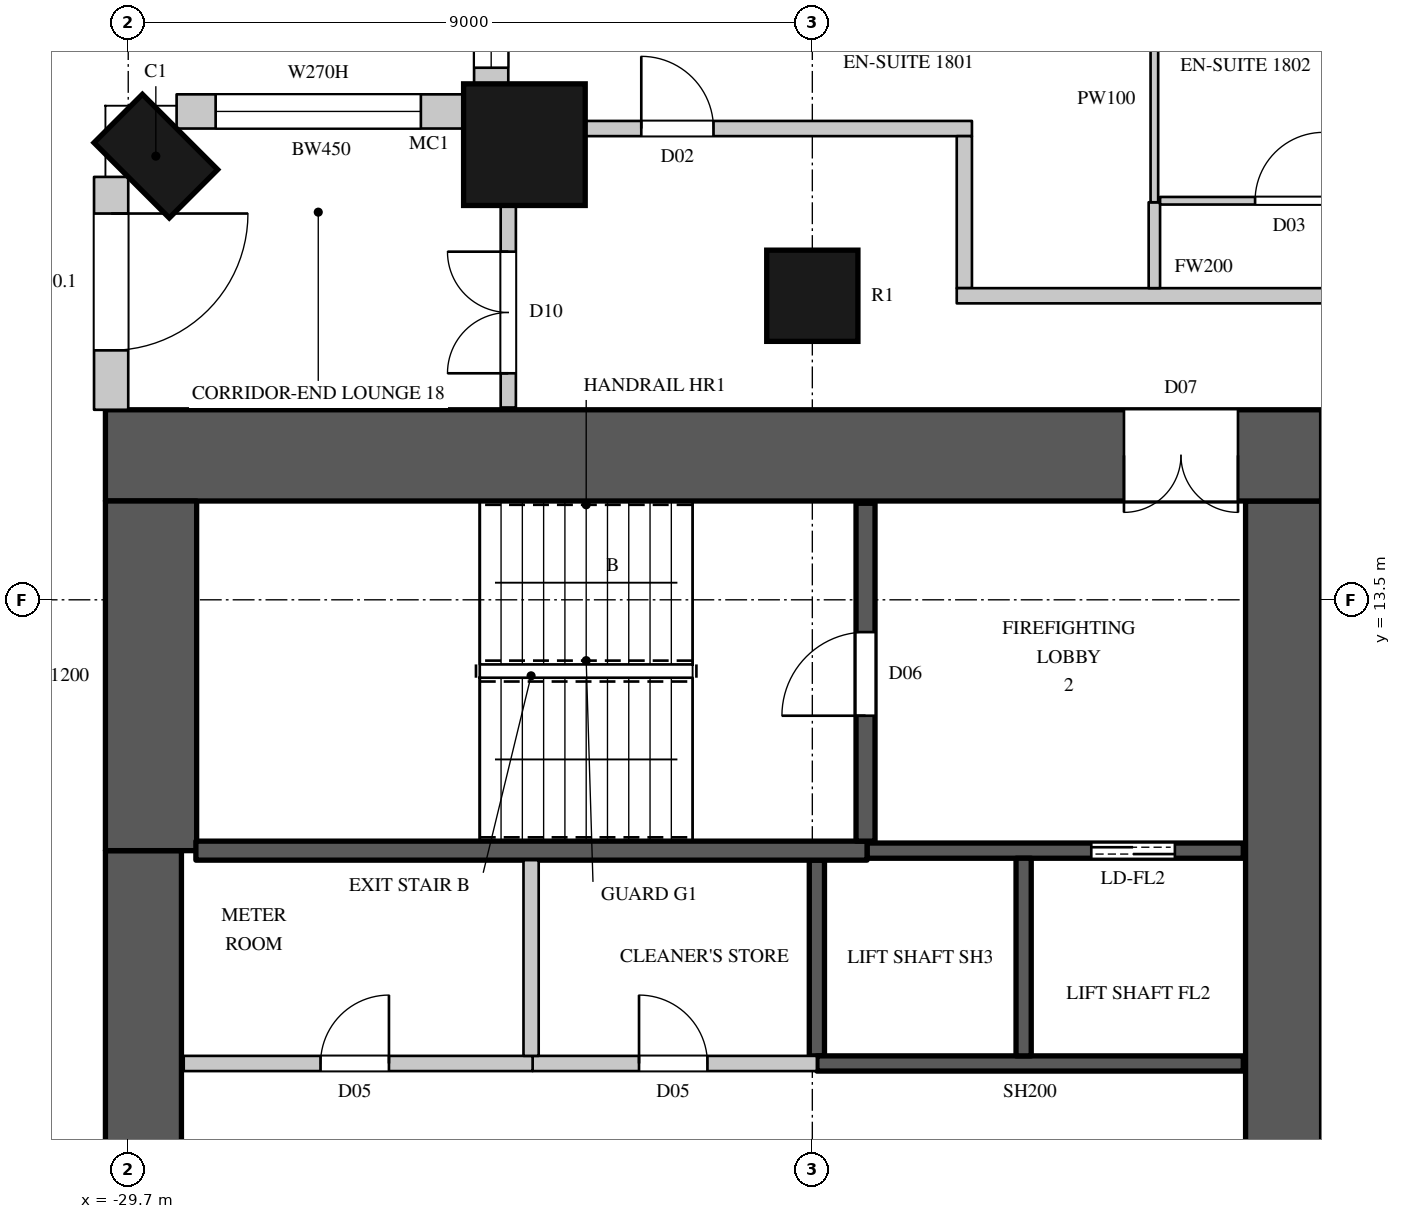
"""IFC4 building model, lengths in metres.
Left out: names, types, materials, properties, quantities, classifications, styles, units other than length and angle.
Written with IfcOpenShell. Run it as: python <this file> out.ifc"""

import sys

from ifc_helpers import new_model, si_unit, direction, frame, frame_2d, origin, origin_2d, place, context, subcontext, project, spatial, rectangle, circle, extrude, element, fill, save


model = new_model("IFC4")
c1 = context("Model", 3, precision=1e-05, world=origin(), true_north=direction((0.0, 1.0)))
c2 = subcontext(c1, "Body", "Model", "MODEL_VIEW")
j1 = project(units=[si_unit("LENGTHUNIT", "METRE"), si_unit("PLANEANGLEUNIT", "RADIAN")], contexts=[c1])
p1 = place(None, origin())
s1 = spatial("IfcSite", under=j1, at=p1, CompositionType="ELEMENT")
p2 = place(p1, origin())
s2 = spatial("IfcBuilding", under=s1, at=p2, CompositionType="ELEMENT")
p3 = place(p2, frame((0.0, 0.0, 95.1)))
s3 = spatial("IfcBuildingStorey", under=s2, at=p3, CompositionType="ELEMENT", Elevation=95.1)
p4 = place(p3, frame((-29.337, 19.337, 0.0), z_axis=(0.0, 0.0, 1.0), x_axis=(-0.707106781187, -0.707106781187, 0.0)))
e1 = element("IfcColumn", 1, at=p4, inside=s3, PredefinedType="COLUMN", context=c2, shape_type="SweptSolid", body=[
    extrude(rectangle(XDim=0.9, YDim=1.4, at=origin_2d()), origin(), (0.0, 0.0, 1.0), 3.6),
])
p5 = place(p3, frame((-24.488, 19.488, 0.0), z_axis=(0.0, 0.0, 1.0), x_axis=(1.0, 0.0, 0.0)))
e2 = element("IfcColumn", 2, at=p5, inside=s3, PredefinedType="COLUMN", context=c2, shape_type="SweptSolid", body=[
    extrude(circle(Radius=0.8, at=origin_2d()), origin(), (0.0, 0.0, 1.0), 3.6),
])
p6 = place(p3, frame((-20.7, 17.5, 0.0), z_axis=(0.0, 0.0, 1.0), x_axis=(1.0, 0.0, 0.0)))
e3 = element("IfcColumn", 3, at=p6, inside=s3, PredefinedType="COLUMN", context=c2, shape_type="SweptSolid", body=[
    extrude(circle(Radius=0.6, at=origin_2d()), origin(), (0.0, 0.0, 1.0), 3.6),
])
p7 = place(p3, frame((-29.925, 19.064, 0.0), z_axis=(0.0, 0.0, 1.0), x_axis=(0.0, -1.0, 0.0)))
e4 = element("IfcWall", 4, at=p7, inside=s3, PredefinedType="SOLIDWALL", context=c2, shape_type="SweptSolid", body=[
    extrude(rectangle(XDim=3.064, YDim=0.45, at=frame_2d((1.532, 0.0))), origin(), (0.0, 0.0, 1.0), 3.3),
])
p8 = place(p7, frame((0.482, 0.0, 0.0)))
e5 = element("IfcOpeningElement", 5, at=p8, cuts=e4, PredefinedType="OPENING", context=c2, shape_type="SweptSolid", body=[
    extrude(rectangle(XDim=1.8, YDim=2.4, at=frame_2d((0.9, 1.2))), frame((0.0, 0.235, 0.0), z_axis=(0.0, -1.0, 0.0), x_axis=(1.0, 0.0, 0.0)), (0.0, 0.0, 1.0), 0.47),
])
p9 = place(p3, frame((-24.925, 22.05, 0.0), z_axis=(0.0, 0.0, 1.0), x_axis=(0.0, -1.0, 0.0)))
e6 = element("IfcWall", 6, at=p9, inside=s3, PredefinedType="SOLIDWALL", context=c2, shape_type="SweptSolid", body=[
    extrude(rectangle(XDim=1.792, YDim=0.45, at=frame_2d((0.896, 0.0))), origin(), (0.0, 0.0, 1.0), 3.3),
])
p10 = place(p9, frame((0.35, 0.0, 1.05)))
e7 = element("IfcOpeningElement", 7, at=p10, cuts=e6, PredefinedType="OPENING", context=c2, shape_type="SweptSolid", body=[
    extrude(rectangle(XDim=1.2, YDim=2.0, at=frame_2d((0.6, 1.0))), frame((0.0, 0.235, 0.0), z_axis=(0.0, -1.0, 0.0), x_axis=(1.0, 0.0, 0.0)), (0.0, 0.0, 1.0), 0.47),
])
p11 = place(p3, frame((-25.259, 19.925, 0.0), z_axis=(0.0, 0.0, 1.0), x_axis=(-1.0, 0.0, 0.0)))
e8 = element("IfcWall", 8, at=p11, inside=s3, PredefinedType="SOLIDWALL", context=c2, shape_type="SweptSolid", body=[
    extrude(rectangle(XDim=3.805, YDim=0.45, at=frame_2d((1.903, 0.0))), origin(), (0.0, 0.0, 1.0), 3.3),
])
p12 = place(p11, frame((0.592, 0.0, 1.05)))
e9 = element("IfcOpeningElement", 9, at=p12, cuts=e8, PredefinedType="OPENING", context=c2, shape_type="SweptSolid", body=[
    extrude(rectangle(XDim=2.7, YDim=2.0, at=frame_2d((1.35, 1.0))), frame((0.0, 0.235, 0.0), z_axis=(0.0, -1.0, 0.0), x_axis=(1.0, 0.0, 0.0)), (0.0, 0.0, 1.0), 0.47),
])
p13 = place(p3, frame((-30.0, 15.4, 0.0), z_axis=(0.0, 0.0, 1.0), x_axis=(1.0, 0.0, 0.0)))
e10 = element("IfcWall", 10, at=p13, inside=s3, PredefinedType="SHEAR", context=c2, shape_type="SweptSolid", body=[
    extrude(rectangle(XDim=16.0, YDim=1.2, at=frame_2d((8.0, 0.0))), origin(), (0.0, 0.0, 1.0), 3.6),
])
p14 = place(p13, frame((13.4, 0.0, 0.0)))
e11 = element("IfcOpeningElement", 11, at=p14, cuts=e10, PredefinedType="OPENING", context=c2, shape_type="SweptSolid", body=[
    extrude(rectangle(XDim=1.5, YDim=2.4, at=frame_2d((0.75, 1.2))), frame((0.0, 0.61, 0.0), z_axis=(0.0, -1.0, 0.0), x_axis=(1.0, 0.0, 0.0)), (0.0, 0.0, 1.0), 1.22),
])
p15 = place(p3, frame((-14.5, -14.8, 0.0), z_axis=(0.0, 0.0, 1.0), x_axis=(0.0, 1.0, 0.0)))
e12 = element("IfcWall", 12, at=p15, inside=s3, PredefinedType="SHEAR", context=c2, shape_type="SweptSolid", body=[
    extrude(rectangle(XDim=29.6, YDim=1.0, at=frame_2d((14.8, 0.0))), origin(), (0.0, 0.0, 1.0), 3.6),
])
p16 = place(p15, frame((8.45, 0.0, 0.0)))
e13 = element("IfcOpeningElement", 13, at=p16, cuts=e12, PredefinedType="OPENING", context=c2, shape_type="SweptSolid", body=[
    extrude(rectangle(XDim=1.5, YDim=2.4, at=frame_2d((0.75, 1.2))), frame((0.0, 0.51, 0.0), z_axis=(0.0, -1.0, 0.0), x_axis=(1.0, 0.0, 0.0)), (0.0, 0.0, 1.0), 1.02),
])
p17 = place(p15, frame((19.65, 0.0, 0.0)))
e14 = element("IfcOpeningElement", 14, at=p17, cuts=e12, PredefinedType="OPENING", context=c2, shape_type="SweptSolid", body=[
    extrude(rectangle(XDim=1.5, YDim=2.4, at=frame_2d((0.75, 1.2))), frame((0.0, 0.51, 0.0), z_axis=(0.0, -1.0, 0.0), x_axis=(1.0, 0.0, 0.0)), (0.0, 0.0, 1.0), 1.02),
])
p18 = place(p15, frame((14.5, 0.0, 0.0)))
e15 = element("IfcOpeningElement", 15, at=p18, cuts=e12, PredefinedType="OPENING", context=c2, shape_type="SweptSolid", body=[
    extrude(rectangle(XDim=0.6, YDim=2.0, at=frame_2d((0.3, 1.0))), frame((0.0, 0.51, 0.0), z_axis=(0.0, -1.0, 0.0), x_axis=(1.0, 0.0, 0.0)), (0.0, 0.0, 1.0), 1.02),
])
p19 = place(p3, frame((-29.5, -10.2, 0.0), z_axis=(0.0, 0.0, 1.0), x_axis=(0.0, 1.0, 0.0)))
e16 = element("IfcWall", 16, at=p19, inside=s3, PredefinedType="SHEAR", context=c2, shape_type="SweptSolid", body=[
    extrude(rectangle(XDim=20.4, YDim=1.0, at=frame_2d((10.2, 0.0))), origin(), (0.0, 0.0, 1.0), 3.6),
])
p20 = place(p3, frame((-29.4, 10.2, 0.0), z_axis=(0.0, 0.0, 1.0), x_axis=(0.0, 1.0, 0.0)))
e17 = element("IfcWall", 17, at=p20, inside=s3, PredefinedType="SHEAR", context=c2, shape_type="SweptSolid", body=[
    extrude(rectangle(XDim=4.6, YDim=1.2, at=frame_2d((2.3, 0.0))), origin(), (0.0, 0.0, 1.0), 3.6),
])
p21 = place(p3, frame((-24.7, 16.03, 0.0), z_axis=(0.0, 0.0, 1.0), x_axis=(0.0, 1.0, 0.0)))
e18 = element("IfcWall", 18, at=p21, inside=s3, PredefinedType="PARTITIONING", context=c2, shape_type="SweptSolid", body=[
    extrude(rectangle(XDim=2.67, YDim=0.2, at=frame_2d((1.335, 0.0))), origin(), (0.0, 0.0, 1.0), 3.3),
])
p22 = place(p21, frame((0.45, 0.0, 0.0)))
e19 = element("IfcOpeningElement", 19, at=p22, cuts=e18, PredefinedType="OPENING", context=c2, shape_type="SweptSolid", body=[
    extrude(rectangle(XDim=1.6, YDim=2.4, at=frame_2d((0.8, 1.2))), frame((0.0, 0.11, 0.0), z_axis=(0.0, -1.0, 0.0), x_axis=(1.0, 0.0, 0.0)), (0.0, 0.0, 1.0), 0.22),
])
p23 = place(p3, frame((-23.7, 19.7, 0.0), z_axis=(0.0, 0.0, 1.0), x_axis=(1.0, 0.0, 0.0)))
e20 = element("IfcWall", 20, at=p23, inside=s3, PredefinedType="PARTITIONING", context=c2, shape_type="SweptSolid", body=[
    extrude(rectangle(XDim=5.1, YDim=0.2, at=frame_2d((2.55, 0.0))), origin(), (0.0, 0.0, 1.0), 3.3),
])
p24 = place(p23, frame((0.75, 0.0, 0.0)))
e21 = element("IfcOpeningElement", 21, at=p24, cuts=e20, PredefinedType="OPENING", context=c2, shape_type="SweptSolid", body=[
    extrude(rectangle(XDim=0.95, YDim=2.2, at=frame_2d((0.475, 1.1))), frame((0.0, 0.11, 0.0), z_axis=(0.0, -1.0, 0.0), x_axis=(1.0, 0.0, 0.0)), (0.0, 0.0, 1.0), 0.22),
])
p25 = place(p3, frame((-24.38, 7.4, 0.0), z_axis=(0.0, 0.0, 1.0), x_axis=(1.0, 0.0, 0.0)))
e22 = element("IfcWall", 22, at=p25, inside=s3, PredefinedType="PARTITIONING", context=c2, shape_type="SweptSolid", body=[
    extrude(rectangle(XDim=3.74, YDim=0.2, at=frame_2d((1.87, 0.0))), origin(), (0.0, 0.0, 1.0), 3.3),
])
p26 = place(p25, frame((1.4, 0.0, 0.0)))
e23 = element("IfcOpeningElement", 23, at=p26, cuts=e22, PredefinedType="OPENING", context=c2, shape_type="SweptSolid", body=[
    extrude(rectangle(XDim=0.9, YDim=2.2, at=frame_2d((0.45, 1.1))), frame((0.0, 0.11, 0.0), z_axis=(0.0, -1.0, 0.0), x_axis=(1.0, 0.0, 0.0)), (0.0, 0.0, 1.0), 0.22),
])
p27 = place(p3, frame((-18.7, 17.6, 0.0), z_axis=(0.0, 0.0, 1.0), x_axis=(0.0, 1.0, 0.0)))
e24 = element("IfcWall", 24, at=p27, inside=s3, PredefinedType="PARTITIONING", context=c2, shape_type="SweptSolid", body=[
    extrude(rectangle(XDim=2.0, YDim=0.2, at=frame_2d((1.0, 0.0))), origin(), (0.0, 0.0, 1.0), 3.3),
])
p28 = place(p3, frame((-18.8, 17.5, 0.0), z_axis=(0.0, 0.0, 1.0), x_axis=(1.0, 0.0, 0.0)))
e25 = element("IfcWall", 25, at=p28, inside=s3, PredefinedType="PARTITIONING", context=c2, shape_type="SweptSolid", body=[
    extrude(rectangle(XDim=6.5, YDim=0.2, at=frame_2d((3.25, 0.0))), origin(), (0.0, 0.0, 1.0), 2.75),
])
p29 = place(p28, frame((5.25, 0.0, 0.0)))
e26 = element("IfcOpeningElement", 26, at=p29, cuts=e25, PredefinedType="OPENING", context=c2, shape_type="SweptSolid", body=[
    extrude(rectangle(XDim=0.95, YDim=2.2, at=frame_2d((0.475, 1.1))), frame((0.0, 0.11, 0.0), z_axis=(0.0, -1.0, 0.0), x_axis=(1.0, 0.0, 0.0)), (0.0, 0.0, 1.0), 0.22),
])
p30 = place(p3, frame((-16.2, 17.6, 0.0), z_axis=(0.0, 0.0, 1.0), x_axis=(0.0, 1.0, 0.0)))
e27 = element("IfcWall", 27, at=p30, inside=s3, PredefinedType="PARTITIONING", context=c2, shape_type="SweptSolid", body=[
    extrude(rectangle(XDim=1.13, YDim=0.15, at=frame_2d((0.565, 0.0))), origin(), (0.0, 0.0, 1.0), 2.65),
])
p31 = place(p3, frame((-28.97, 7.4, 0.0), z_axis=(0.0, 0.0, 1.0), x_axis=(1.0, 0.0, 0.0)))
e28 = element("IfcWall", 28, at=p31, inside=s3, PredefinedType="PARTITIONING", context=c2, shape_type="SweptSolid", body=[
    extrude(rectangle(XDim=4.59, YDim=0.2, at=frame_2d((2.295, 0.0))), origin(), (0.0, 0.0, 1.0), 3.3),
])
p32 = place(p31, frame((1.8, 0.0, 0.0)))
e29 = element("IfcOpeningElement", 29, at=p32, cuts=e28, PredefinedType="OPENING", context=c2, shape_type="SweptSolid", body=[
    extrude(rectangle(XDim=0.9, YDim=2.2, at=frame_2d((0.45, 1.1))), frame((0.0, 0.11, 0.0), z_axis=(0.0, -1.0, 0.0), x_axis=(1.0, 0.0, 0.0)), (0.0, 0.0, 1.0), 0.22),
])
p33 = place(p3, frame((-24.4, 7.5, 0.0), z_axis=(0.0, 0.0, 1.0), x_axis=(0.0, 1.0, 0.0)))
e30 = element("IfcWall", 30, at=p33, inside=s3, PredefinedType="PARTITIONING", context=c2, shape_type="SweptSolid", body=[
    extrude(rectangle(XDim=2.575, YDim=0.2, at=frame_2d((1.288, 0.0))), origin(), (0.0, 0.0, 1.0), 3.3),
])
p34 = place(p3, frame((-20.64, 7.5, 0.0), z_axis=(0.0, 0.0, 1.0), x_axis=(0.0, 1.0, 0.0)))
e31 = element("IfcWall", 31, at=p34, inside=s3, PredefinedType="SHEAR", context=c2, shape_type="SweptSolid", body=[
    extrude(rectangle(XDim=2.575, YDim=0.2, at=frame_2d((1.288, 0.0))), origin(), (0.0, 0.0, 1.0), 3.3),
])
p35 = place(p3, frame((-20.64, 7.4, 0.0), z_axis=(0.0, 0.0, 1.0), x_axis=(1.0, 0.0, 0.0)))
e32 = element("IfcWall", 32, at=p35, inside=s3, PredefinedType="SHEAR", context=c2, shape_type="SweptSolid", body=[
    extrude(rectangle(XDim=5.61, YDim=0.2, at=frame_2d((2.805, 0.0))), origin(), (0.0, 0.0, 1.0), 3.3),
])
p36 = place(p3, frame((-19.98, 10.2, 0.0), z_axis=(0.0, 0.0, 1.0), x_axis=(1.0, 0.0, 0.0)))
e33 = element("IfcWall", 33, at=p36, inside=s3, PredefinedType="SHEAR", context=c2, shape_type="SweptSolid", body=[
    extrude(rectangle(XDim=4.95, YDim=0.2, at=frame_2d((2.475, 0.0))), origin(), (0.0, 0.0, 1.0), 3.3),
])
p37 = place(p36, frame((2.95, 0.0, 0.0)))
e34 = element("IfcOpeningElement", 34, at=p37, cuts=e33, PredefinedType="OPENING", context=c2, shape_type="SweptSolid", body=[
    extrude(rectangle(XDim=1.1, YDim=2.2, at=frame_2d((0.55, 1.1))), frame((0.0, 0.11, 0.0), z_axis=(0.0, -1.0, 0.0), x_axis=(1.0, 0.0, 0.0)), (0.0, 0.0, 1.0), 0.22),
])
p38 = place(p3, frame((-17.92, 7.5, 0.0), z_axis=(0.0, 0.0, 1.0), x_axis=(0.0, 1.0, 0.0)))
e35 = element("IfcWall", 35, at=p38, inside=s3, PredefinedType="SHEAR", context=c2, shape_type="SweptSolid", body=[
    extrude(rectangle(XDim=2.6, YDim=0.2, at=frame_2d((1.3, 0.0))), origin(), (0.0, 0.0, 1.0), 3.6),
])
p39 = place(p3, frame((-28.81, 10.2, 0.0), z_axis=(0.0, 0.0, 1.0), x_axis=(1.0, 0.0, 0.0)))
e36 = element("IfcWall", 36, at=p39, inside=s3, PredefinedType="SHEAR", context=c2, shape_type="SweptSolid", body=[
    extrude(rectangle(XDim=8.83, YDim=0.25, at=frame_2d((4.415, 0.0))), origin(), (0.0, 0.0, 1.0), 3.3),
])
p40 = place(p3, frame((-20.0, 10.325, 0.0), z_axis=(0.0, 0.0, 1.0), x_axis=(0.0, 1.0, 0.0)))
e37 = element("IfcWall", 37, at=p40, inside=s3, PredefinedType="SHEAR", context=c2, shape_type="SweptSolid", body=[
    extrude(rectangle(XDim=4.445, YDim=0.25, at=frame_2d((2.223, 0.0))), origin(), (0.0, 0.0, 1.0), 3.3),
])
p41 = place(p40, frame((1.65, 0.0, 0.0)))
e38 = element("IfcOpeningElement", 38, at=p41, cuts=e37, PredefinedType="OPENING", context=c2, shape_type="SweptSolid", body=[
    extrude(rectangle(XDim=1.1, YDim=2.2, at=frame_2d((0.55, 1.1))), frame((0.0, 0.135, 0.0), z_axis=(0.0, -1.0, 0.0), x_axis=(1.0, 0.0, 0.0)), (0.0, 0.0, 1.0), 0.27),
])
p42 = place(p3, frame((-16.2, 18.73, 0.0), z_axis=(0.0, 0.0, 1.0), x_axis=(0.0, 1.0, 0.0)))
e39 = element("IfcWall", 39, at=p42, inside=s3, PredefinedType="PARTITIONING", context=c2, shape_type="SweptSolid", body=[
    extrude(rectangle(XDim=2.7, YDim=0.1, at=frame_2d((1.35, 0.0))), origin(), (0.0, 0.0, 1.0), 2.65),
])
p43 = place(p3, frame((-16.125, 18.75, 0.0), z_axis=(0.0, 0.0, 1.0), x_axis=(1.0, 0.0, 0.0)))
e40 = element("IfcWall", 40, at=p43, inside=s3, PredefinedType="PARTITIONING", context=c2, shape_type="SweptSolid", body=[
    extrude(rectangle(XDim=2.371, YDim=0.1, at=frame_2d((1.186, 0.0))), origin(), (0.0, 0.0, 1.0), 3.3),
])
p44 = place(p43, frame((1.25, 0.0, 0.0)))
e41 = element("IfcOpeningElement", 41, at=p44, cuts=e40, PredefinedType="OPENING", context=c2, shape_type="SweptSolid", body=[
    extrude(rectangle(XDim=0.9, YDim=2.2, at=frame_2d((0.45, 1.1))), frame((0.0, 0.06, 0.0), z_axis=(0.0, -1.0, 0.0), x_axis=(1.0, 0.0, 0.0)), (0.0, 0.0, 1.0), 0.12),
])
p45 = place(p8, origin())
e42 = element("IfcDoor", 42, at=p45, inside=s3, OperationType="SLIDING_TO_LEFT", PredefinedType="DOOR", context=c2, shape_type="SweptSolid", body=[
    extrude(rectangle(XDim=1.8, YDim=2.4, at=frame_2d((0.9, 1.2))), frame((0.0, 0.13, 0.0), z_axis=(0.0, -1.0, 0.0), x_axis=(1.0, 0.0, 0.0)), (0.0, 0.0, 1.0), 0.05),
])
fill(e5, e42)
p46 = place(p10, origin())
e43 = element("IfcWindow", 43, at=p46, inside=s3, PartitioningType="SINGLE_PANEL", PredefinedType="WINDOW", context=c2, shape_type="SweptSolid", body=[
    extrude(rectangle(XDim=1.2, YDim=2.0, at=frame_2d((0.6, 1.0))), frame((0.0, 0.135, 0.0), z_axis=(0.0, -1.0, 0.0), x_axis=(1.0, 0.0, 0.0)), (0.0, 0.0, 1.0), 0.06),
])
fill(e7, e43)
p47 = place(p12, origin())
e44 = element("IfcWindow", 44, at=p47, inside=s3, PartitioningType="SINGLE_PANEL", PredefinedType="WINDOW", context=c2, shape_type="SweptSolid", body=[
    extrude(rectangle(XDim=2.7, YDim=2.0, at=frame_2d((1.35, 1.0))), frame((0.0, 0.135, 0.0), z_axis=(0.0, -1.0, 0.0), x_axis=(1.0, 0.0, 0.0)), (0.0, 0.0, 1.0), 0.06),
])
fill(e9, e44)
p48 = place(p41, origin())
e45 = element("IfcDoor", 45, at=p48, inside=s3, OperationType="SINGLE_SWING_LEFT", PredefinedType="DOOR", context=c2, shape_type="SweptSolid", body=[
    extrude(rectangle(XDim=1.1, YDim=2.2, at=frame_2d((0.55, 1.1))), frame((0.0, 0.025, 0.0), z_axis=(0.0, -1.0, 0.0), x_axis=(1.0, 0.0, 0.0)), (0.0, 0.0, 1.0), 0.05),
])
fill(e38, e45)
p49 = place(p32, origin())
e46 = element("IfcDoor", 46, at=p49, inside=s3, OperationType="SINGLE_SWING_RIGHT", PredefinedType="DOOR", context=c2, shape_type="SweptSolid", body=[
    extrude(rectangle(XDim=0.9, YDim=2.2, at=frame_2d((0.45, 1.1))), frame((0.0, 0.025, 0.0), z_axis=(0.0, -1.0, 0.0), x_axis=(1.0, 0.0, 0.0)), (0.0, 0.0, 1.0), 0.05),
])
fill(e29, e46)
p50 = place(p26, origin())
e47 = element("IfcDoor", 47, at=p50, inside=s3, OperationType="SINGLE_SWING_LEFT", PredefinedType="DOOR", context=c2, shape_type="SweptSolid", body=[
    extrude(rectangle(XDim=0.9, YDim=2.2, at=frame_2d((0.45, 1.1))), frame((0.0, 0.025, 0.0), z_axis=(0.0, -1.0, 0.0), x_axis=(1.0, 0.0, 0.0)), (0.0, 0.0, 1.0), 0.05),
])
fill(e23, e47)
p51 = place(p37, origin())
e48 = element("IfcDoor", 48, at=p51, inside=s3, OperationType="DOUBLE_DOOR_SLIDING", PredefinedType="DOOR", context=c2, shape_type="SweptSolid", body=[
    extrude(rectangle(XDim=1.1, YDim=2.2, at=frame_2d((0.55, 1.1))), frame((0.0, 0.025, 0.0), z_axis=(0.0, -1.0, 0.0), x_axis=(1.0, 0.0, 0.0)), (0.0, 0.0, 1.0), 0.05),
])
fill(e34, e48)
p52 = place(p22, origin())
e49 = element("IfcDoor", 49, at=p52, inside=s3, OperationType="DOUBLE_DOOR_SINGLE_SWING", PredefinedType="DOOR", context=c2, shape_type="SweptSolid", body=[
    extrude(rectangle(XDim=1.6, YDim=2.4, at=frame_2d((0.8, 1.2))), frame((0.0, 0.025, 0.0), z_axis=(0.0, -1.0, 0.0), x_axis=(1.0, 0.0, 0.0)), (0.0, 0.0, 1.0), 0.05),
])
fill(e19, e49)
p53 = place(p24, origin())
e50 = element("IfcDoor", 50, at=p53, inside=s3, OperationType="SINGLE_SWING_LEFT", PredefinedType="DOOR", context=c2, shape_type="SweptSolid", body=[
    extrude(rectangle(XDim=0.95, YDim=2.2, at=frame_2d((0.475, 1.1))), frame((0.0, 0.025, 0.0), z_axis=(0.0, -1.0, 0.0), x_axis=(1.0, 0.0, 0.0)), (0.0, 0.0, 1.0), 0.05),
])
fill(e21, e50)
p54 = place(p44, origin())
e51 = element("IfcDoor", 51, at=p54, inside=s3, OperationType="SINGLE_SWING_RIGHT", PredefinedType="DOOR", context=c2, shape_type="SweptSolid", body=[
    extrude(rectangle(XDim=0.9, YDim=2.2, at=frame_2d((0.45, 1.1))), frame((0.0, 0.025, 0.0), z_axis=(0.0, -1.0, 0.0), x_axis=(1.0, 0.0, 0.0)), (0.0, 0.0, 1.0), 0.05),
])
fill(e41, e51)
p55 = place(p14, origin())
e52 = element("IfcDoor", 52, at=p55, inside=s3, OperationType="DOUBLE_DOOR_SINGLE_SWING", PredefinedType="DOOR", context=c2, shape_type="SweptSolid", body=[
    extrude(rectangle(XDim=1.5, YDim=2.4, at=frame_2d((0.75, 1.2))), frame((0.0, 0.025, 0.0), z_axis=(0.0, -1.0, 0.0), x_axis=(1.0, 0.0, 0.0)), (0.0, 0.0, 1.0), 0.05),
])
fill(e11, e52)
save(model, sys.argv[1])
